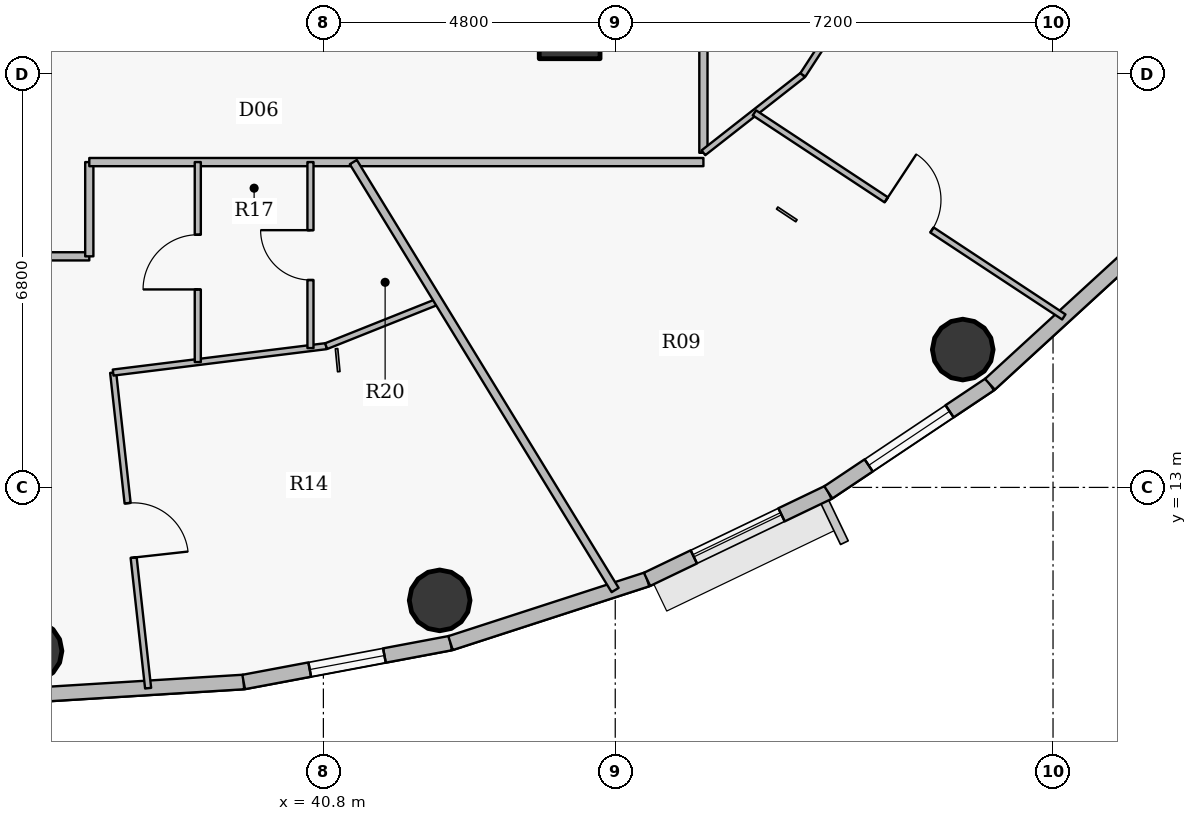
"""IFC4 building model, lengths in metres.
Left out: names, types, materials, properties, quantities, classifications, styles, units other than length and angle.
Written with IfcOpenShell. Run it as: python <this file> out.ifc"""

import sys

from ifc_helpers import new_model, si_unit, direction, frame, frame_2d, origin, origin_2d, place, context, subcontext, project, spatial, rectangle, hollow_circle, extrude, source, transform, mapped, element, fill, save


model = new_model("IFC4")
c1 = context("Model", 3, precision=1e-05, world=origin(), true_north=direction((0.0, 1.0)))
c2 = subcontext(c1, "Body", "Model", "MODEL_VIEW")
j1 = project(units=[si_unit("LENGTHUNIT", "METRE"), si_unit("PLANEANGLEUNIT", "RADIAN")], contexts=[c1])
p1 = place(None, origin())
s1 = spatial("IfcSite", under=j1, at=p1, CompositionType="ELEMENT")
p2 = place(p1, origin())
s2 = spatial("IfcBuilding", under=s1, at=p2, CompositionType="ELEMENT")
p3 = place(p2, frame((0.0, 0.0, 288.0)))
s3 = spatial("IfcBuildingStorey", under=s2, at=p3, CompositionType="ELEMENT", Elevation=288.0)
p4 = place(p3, frame((44.85, 20.55, 0.0), z_axis=(0.0, 0.0, 1.0), x_axis=(1.0, 0.0, 0.0)))
e1 = element("IfcColumn", 1, at=p4, inside=s3, PredefinedType="COLUMN", context=c2, shape_type="SweptSolid", body=[
    extrude(rectangle(XDim=1.0, YDim=1.0, at=origin_2d()), origin(), (0.0, 0.0, 1.0), 3.75),
])
for number, where, z_axis, x_axis in (
    (2, (36.0, 10.31, 0.0), (0.0, 0.0, 1.0), (1.0, 0.0, 0.0)),
    (3, (42.712, 11.142, 0.0), (0.0, 0.0, 1.0), (1.0, 0.0, 0.0)),
    (4, (51.315, 15.267, 0.0), (0.0, 0.0, 1.0), (1.0, 0.0, 0.0)),
):
    element("IfcColumn", number, at=place(p3, frame(where, z_axis=z_axis, x_axis=x_axis)), inside=s3, PredefinedType="COLUMN", context=c2, shape_type="SweptSolid", body=[
        extrude(hollow_circle(Radius=0.5, WallThickness=0.032, at=origin_2d()), origin(), (0.0, 0.0, 1.0), 3.75),
    ])
p5 = place(p3, frame((39.489, 9.8, 0.0), z_axis=(0.0, 0.0, 1.0), x_axis=(-0.998104946479, -0.061534671648, 0.0)))
e5 = element("IfcWall", 5, at=p5, inside=s3, PredefinedType="SOLIDWALL", context=c2, shape_type="SweptSolid", body=[
    extrude(rectangle(XDim=3.495, YDim=0.24, at=frame_2d((1.748, 0.0))), origin(), (0.0, 0.0, 1.0), 3.5),
])
p6 = place(p3, frame((42.891, 10.44, 0.0), z_axis=(0.0, 0.0, 1.0), x_axis=(-0.982782655757, -0.184765395959, 0.0)))
e6 = element("IfcWall", 6, at=p6, inside=s3, PredefinedType="SOLIDWALL", context=c2, shape_type="SweptSolid", body=[
    extrude(rectangle(XDim=3.462, YDim=0.24, at=frame_2d((1.731, 0.0))), origin(), (0.0, 0.0, 1.0), 3.5),
])
p7 = place(p6, frame((1.106, 0.0, 0.9)))
e7 = element("IfcOpeningElement", 7, at=p7, cuts=e6, PredefinedType="OPENING", context=c2, shape_type="SweptSolid", body=[
    extrude(rectangle(XDim=1.25, YDim=1.65, at=origin_2d()), frame((0.625, 0.13, 0.825), z_axis=(0.0, -1.0, 0.0), x_axis=(1.0, 0.0, 0.0)), (0.0, 0.0, 1.0), 0.26),
])
p8 = place(p3, frame((46.123, 11.488, 0.0), z_axis=(0.0, 0.0, 1.0), x_axis=(-0.95123136723, -0.308478339592, 0.0)))
e8 = element("IfcWall", 8, at=p8, inside=s3, PredefinedType="SOLIDWALL", context=c2, shape_type="SweptSolid", body=[
    extrude(rectangle(XDim=3.398, YDim=0.24, at=frame_2d((1.699, 0.0))), origin(), (0.0, 0.0, 1.0), 3.5),
])
p9 = place(p3, frame((49.104, 12.918, 0.0), z_axis=(0.0, 0.0, 1.0), x_axis=(-0.901573741254, -0.43262546051, 0.0)))
e9 = element("IfcWall", 9, at=p9, inside=s3, PredefinedType="SOLIDWALL", context=c2, shape_type="SweptSolid", body=[
    extrude(rectangle(XDim=3.307, YDim=0.24, at=frame_2d((1.653, 0.0))), origin(), (0.0, 0.0, 1.0), 3.5),
])
p10 = place(p9, frame((0.854, 0.0, 0.9)))
e10 = element("IfcOpeningElement", 10, at=p10, cuts=e9, PredefinedType="OPENING", context=c2, shape_type="SweptSolid", body=[
    extrude(rectangle(XDim=1.6, YDim=1.75, at=origin_2d()), frame((0.8, 0.13, 0.875), z_axis=(0.0, -1.0, 0.0), x_axis=(1.0, 0.0, 0.0)), (0.0, 0.0, 1.0), 0.26),
])
p11 = place(p3, frame((51.762, 14.696, 0.0), z_axis=(0.0, 0.0, 1.0), x_axis=(-0.831250592635, -0.55589787933, 0.0)))
e11 = element("IfcWall", 11, at=p11, inside=s3, PredefinedType="SOLIDWALL", context=c2, shape_type="SweptSolid", body=[
    extrude(rectangle(XDim=3.197, YDim=0.24, at=frame_2d((1.599, 0.0))), origin(), (0.0, 0.0, 1.0), 3.5),
])
p12 = place(p11, frame((0.799, 0.0, 0.9)))
e12 = element("IfcOpeningElement", 12, at=p12, cuts=e11, PredefinedType="OPENING", context=c2, shape_type="SweptSolid", body=[
    extrude(rectangle(XDim=1.6, YDim=1.75, at=origin_2d()), frame((0.8, 0.13, 0.875), z_axis=(0.0, -1.0, 0.0), x_axis=(1.0, 0.0, 0.0)), (0.0, 0.0, 1.0), 0.26),
])
p13 = place(p3, frame((54.03, 16.775, 0.0), z_axis=(0.0, 0.0, 1.0), x_axis=(-0.737068506972, -0.675818034703, 0.0)))
e13 = element("IfcWall", 13, at=p13, inside=s3, PredefinedType="SOLIDWALL", context=c2, shape_type="SweptSolid", body=[
    extrude(rectangle(XDim=3.077, YDim=0.24, at=frame_2d((1.539, 0.0))), origin(), (0.0, 0.0, 1.0), 3.5),
])
p14 = place(p3, frame((35.05, 16.8, 0.0), z_axis=(0.0, 0.0, 1.0), x_axis=(1.0, 0.0, 0.0)))
e14 = element("IfcWall", 14, at=p14, inside=s3, PredefinedType="PARTITIONING", context=c2, shape_type="SweptSolid", body=[
    extrude(rectangle(XDim=1.9, YDim=0.135, at=frame_2d((0.95, 0.0))), origin(), (0.0, 0.0, 1.0), 3.035),
])
p15 = place(p3, frame((36.95, 16.8, 0.0), z_axis=(0.0, 0.0, 1.0), x_axis=(0.0, 1.0, 0.0)))
e15 = element("IfcWall", 15, at=p15, inside=s3, PredefinedType="PARTITIONING", context=c2, shape_type="SweptSolid", body=[
    extrude(rectangle(XDim=1.55, YDim=0.135, at=frame_2d((0.775, 0.0))), origin(), (0.0, 0.0, 1.0), 3.5),
])
p16 = place(p3, frame((36.95, 18.35, 0.0), z_axis=(0.0, 0.0, 1.0), x_axis=(1.0, 0.0, 0.0)))
e16 = element("IfcWall", 16, at=p16, inside=s3, PredefinedType="PARTITIONING", context=c2, shape_type="SweptSolid", body=[
    extrude(rectangle(XDim=10.1, YDim=0.135, at=frame_2d((5.05, 0.0))), origin(), (0.0, 0.0, 1.0), 3.035),
])
p17 = place(p3, frame((37.342, 14.888, 0.0), z_axis=(0.0, 0.0, 1.0), x_axis=(0.110149295127, -0.993915053102, 0.0)))
e17 = element("IfcWall", 17, at=p17, inside=s3, PredefinedType="PARTITIONING", context=c2, shape_type="SweptSolid", body=[
    extrude(rectangle(XDim=5.222, YDim=0.1, at=frame_2d((2.611, 0.0))), origin(), (0.0, 0.0, 1.0), 2.985),
])
p18 = place(p17, frame((2.161, 0.0, 0.0)))
e18 = element("IfcOpeningElement", 18, at=p18, cuts=e17, PredefinedType="OPENING", context=c2, shape_type="SweptSolid", body=[
    extrude(rectangle(XDim=0.9, YDim=2.1, at=origin_2d()), frame((0.45, 0.06, 1.05), z_axis=(0.0, -1.0, 0.0), x_axis=(1.0, 0.0, 0.0)), (0.0, 0.0, 1.0), 0.12),
])
p19 = place(p3, frame((37.342, 14.888, 0.0), z_axis=(0.0, 0.0, 1.0), x_axis=(0.992393420873, 0.123106856865, 0.0)))
e19 = element("IfcWall", 19, at=p19, inside=s3, PredefinedType="PARTITIONING", context=c2, shape_type="SweptSolid", body=[
    extrude(rectangle(XDim=3.53, YDim=0.1, at=frame_2d((1.765, 0.0))), origin(), (0.0, 0.0, 1.0), 2.985),
])
p20 = place(p3, frame((38.734, 15.061, 0.0), z_axis=(0.0, 0.0, 1.0), x_axis=(0.0, 1.0, 0.0)))
e20 = element("IfcWall", 20, at=p20, inside=s3, PredefinedType="PARTITIONING", context=c2, shape_type="SweptSolid", body=[
    extrude(rectangle(XDim=3.289, YDim=0.1, at=frame_2d((1.645, 0.0))), origin(), (0.0, 0.0, 1.0), 3.5),
])
p21 = place(p20, frame((1.194, 0.0, 0.0)))
e21 = element("IfcOpeningElement", 21, at=p21, cuts=e20, PredefinedType="OPENING", context=c2, shape_type="SweptSolid", body=[
    extrude(rectangle(XDim=0.9, YDim=2.1, at=origin_2d()), frame((0.45, 0.06, 1.05), z_axis=(0.0, -1.0, 0.0), x_axis=(1.0, 0.0, 0.0)), (0.0, 0.0, 1.0), 0.12),
])
p22 = place(p3, frame((40.587, 15.291, 0.0), z_axis=(0.0, 0.0, 1.0), x_axis=(0.0, 1.0, 0.0)))
e22 = element("IfcWall", 22, at=p22, inside=s3, PredefinedType="PARTITIONING", context=c2, shape_type="SweptSolid", body=[
    extrude(rectangle(XDim=3.059, YDim=0.1, at=frame_2d((1.53, 0.0))), origin(), (0.0, 0.0, 1.0), 3.035),
])
p23 = place(p22, frame((1.119, 0.0, 0.0)))
e23 = element("IfcOpeningElement", 23, at=p23, cuts=e22, PredefinedType="OPENING", context=c2, shape_type="SweptSolid", body=[
    extrude(rectangle(XDim=0.82, YDim=2.1, at=origin_2d()), frame((0.41, 0.06, 1.05), z_axis=(0.0, -1.0, 0.0), x_axis=(1.0, 0.0, 0.0)), (0.0, 0.0, 1.0), 0.12),
])
p24 = place(p3, frame((40.845, 15.323, 0.0), z_axis=(0.0, 0.0, 1.0), x_axis=(0.928797929692, 0.370586569913, 0.0)))
e24 = element("IfcWall", 24, at=p24, inside=s3, PredefinedType="PARTITIONING", context=c2, shape_type="SweptSolid", body=[
    extrude(rectangle(XDim=1.99, YDim=0.1, at=frame_2d((0.995, 0.0))), origin(), (0.0, 0.0, 1.0), 3.035),
])
p25 = place(p3, frame((41.292, 18.35, 0.0), z_axis=(0.0, 0.0, 1.0), x_axis=(0.521891606098, -0.853011812043, 0.0)))
e25 = element("IfcWall", 25, at=p25, inside=s3, PredefinedType="PARTITIONING", context=c2, shape_type="SweptSolid", body=[
    extrude(rectangle(XDim=8.25, YDim=0.135, at=frame_2d((4.125, 0.0))), origin(), (0.0, 0.0, 1.0), 2.985),
])
p26 = place(p3, frame((47.05, 18.503, 0.0), z_axis=(0.0, 0.0, 1.0), x_axis=(0.0, 1.0, 0.0)))
e26 = element("IfcWall", 26, at=p26, inside=s3, PredefinedType="PARTITIONING", context=c2, shape_type="SweptSolid", body=[
    extrude(rectangle(XDim=16.995, YDim=0.135, at=frame_2d((8.497, 0.0))), origin(), (0.0, 0.0, 1.0), 3.035),
])
p27 = place(p26, frame((7.997, 0.0, 0.0)))
e27 = element("IfcOpeningElement", 27, at=p27, cuts=e26, PredefinedType="OPENING", context=c2, shape_type="SweptSolid", body=[
    extrude(rectangle(XDim=1.0, YDim=2.15, at=origin_2d()), frame((0.5, 0.078, 1.075), z_axis=(0.0, -1.0, 0.0), x_axis=(1.0, 0.0, 0.0)), (0.0, 0.0, 1.0), 0.155),
])
p28 = place(p3, frame((47.05, 18.503, 0.0), z_axis=(0.0, 0.0, 1.0), x_axis=(0.787328855274, 0.616533270516, 0.0)))
e28 = element("IfcWall", 28, at=p28, inside=s3, PredefinedType="PARTITIONING", context=c2, shape_type="SweptSolid", body=[
    extrude(rectangle(XDim=2.077, YDim=0.1, at=frame_2d((1.039, 0.0))), origin(), (0.0, 0.0, 1.0), 3.035),
])
p29 = place(p3, frame((47.889, 19.159, 0.0), z_axis=(0.0, 0.0, 1.0), x_axis=(0.834800486956, -0.550552583299, 0.0)))
e29 = element("IfcWall", 29, at=p29, inside=s3, PredefinedType="PARTITIONING", context=c2, shape_type="SweptSolid", body=[
    extrude(rectangle(XDim=6.096, YDim=0.1, at=frame_2d((3.048, 0.0))), origin(), (0.0, 0.0, 1.0), 2.985),
])
p30 = place(p29, frame((2.598, 0.0, 0.0)))
e30 = element("IfcOpeningElement", 30, at=p30, cuts=e29, PredefinedType="OPENING", context=c2, shape_type="SweptSolid", body=[
    extrude(rectangle(XDim=0.9, YDim=2.1, at=origin_2d()), frame((0.45, 0.06, 1.05), z_axis=(0.0, -1.0, 0.0), x_axis=(1.0, 0.0, 0.0)), (0.0, 0.0, 1.0), 0.12),
])
p31 = place(p3, frame((48.685, 19.783, 0.0), z_axis=(0.0, 0.0, 1.0), x_axis=(0.545435886628, 0.838152547916, 0.0)))
e31 = element("IfcWall", 31, at=p31, inside=s3, PredefinedType="PARTITIONING", context=c2, shape_type="SweptSolid", body=[
    extrude(rectangle(XDim=4.083, YDim=0.1, at=frame_2d((2.042, 0.0))), origin(), (0.0, 0.0, 1.0), 3.035),
])
p32 = place(p31, frame((1.592, 0.0, 0.0)))
e32 = element("IfcOpeningElement", 32, at=p32, cuts=e31, PredefinedType="OPENING", context=c2, shape_type="SweptSolid", body=[
    extrude(rectangle(XDim=0.9, YDim=2.1, at=origin_2d()), frame((0.45, 0.06, 1.05), z_axis=(0.0, -1.0, 0.0), x_axis=(1.0, 0.0, 0.0)), (0.0, 0.0, 1.0), 0.12),
])
p33 = place(p3, frame((44.36, 20.2, 0.0), z_axis=(0.0, 0.0, 1.0), x_axis=(1.0, 0.0, 0.0)))
e33 = element("IfcWall", 33, at=p33, inside=s3, PredefinedType="PARTITIONING", context=c2, shape_type="SweptSolid", body=[
    extrude(rectangle(XDim=0.84, YDim=0.135, at=frame_2d((0.42, 0.0))), origin(), (0.0, 0.0, 1.0), 3.035),
])
m1 = source(origin(), c2, "Body", "SweptSolid", [
    extrude(rectangle(XDim=1.6, YDim=1.75, at=origin_2d()), frame((0.8, 0.03, 0.875), z_axis=(0.0, -1.0, 0.0), x_axis=(1.0, 0.0, 0.0)), (0.0, 0.0, 1.0), 0.06),
])
p34 = place(p10, origin())
e34 = element("IfcWindow", 34, at=p34, inside=s3, PartitioningType="DOUBLE_PANEL_VERTICAL", PredefinedType="WINDOW", context=c2, shape_type="MappedRepresentation", body=[
    mapped(m1, transform((0.0, 0.0, 0.0), x_axis=(1.0, 0.0, 0.0), y_axis=(0.0, 1.0, 0.0), z_axis=(0.0, 0.0, 1.0), scale=1.0)),
])
fill(e10, e34)
p35 = place(p12, origin())
e35 = element("IfcWindow", 35, at=p35, inside=s3, PartitioningType="DOUBLE_PANEL_VERTICAL", PredefinedType="WINDOW", context=c2, shape_type="MappedRepresentation", body=[
    mapped(m1, transform((0.0, 0.0, 0.0), x_axis=(1.0, 0.0, 0.0), y_axis=(0.0, 1.0, 0.0), z_axis=(0.0, 0.0, 1.0), scale=1.0)),
])
fill(e12, e35)
m2 = source(origin(), c2, "Body", "SweptSolid", [
    extrude(rectangle(XDim=1.25, YDim=1.65, at=origin_2d()), frame((0.625, 0.03, 0.825), z_axis=(0.0, -1.0, 0.0), x_axis=(1.0, 0.0, 0.0)), (0.0, 0.0, 1.0), 0.06),
])
p36 = place(p7, origin())
e36 = element("IfcWindow", 36, at=p36, inside=s3, PartitioningType="SINGLE_PANEL", PredefinedType="WINDOW", context=c2, shape_type="MappedRepresentation", body=[
    mapped(m2, transform((0.0, 0.0, 0.0), x_axis=(1.0, 0.0, 0.0), y_axis=(0.0, 1.0, 0.0), z_axis=(0.0, 0.0, 1.0), scale=1.0)),
])
fill(e7, e36)
m3 = source(origin(), c2, "Body", "SweptSolid", [
    extrude(rectangle(XDim=0.9, YDim=2.1, at=origin_2d()), frame((0.45, 0.025, 1.05), z_axis=(0.0, -1.0, 0.0), x_axis=(1.0, 0.0, 0.0)), (0.0, 0.0, 1.0), 0.05),
])
p37 = place(p18, origin())
e37 = element("IfcDoor", 37, at=p37, inside=s3, OperationType="SINGLE_SWING_RIGHT", PredefinedType="DOOR", context=c2, shape_type="MappedRepresentation", body=[
    mapped(m3, transform((0.0, 0.0, 0.0), x_axis=(1.0, 0.0, 0.0), y_axis=(0.0, 1.0, 0.0), z_axis=(0.0, 0.0, 1.0), scale=1.0)),
])
fill(e18, e37)
p38 = place(p21, origin())
e38 = element("IfcDoor", 38, at=p38, inside=s3, OperationType="SINGLE_SWING_LEFT", PredefinedType="DOOR", context=c2, shape_type="MappedRepresentation", body=[
    mapped(m3, transform((0.0, 0.0, 0.0), x_axis=(1.0, 0.0, 0.0), y_axis=(0.0, 1.0, 0.0), z_axis=(0.0, 0.0, 1.0), scale=1.0)),
])
fill(e21, e38)
m4 = source(origin(), c2, "Body", "SweptSolid", [
    extrude(rectangle(XDim=0.82, YDim=2.1, at=origin_2d()), frame((0.41, 0.025, 1.05), z_axis=(0.0, -1.0, 0.0), x_axis=(1.0, 0.0, 0.0)), (0.0, 0.0, 1.0), 0.05),
])
p39 = place(p23, origin())
e39 = element("IfcDoor", 39, at=p39, inside=s3, OperationType="SINGLE_SWING_RIGHT", PredefinedType="DOOR", context=c2, shape_type="MappedRepresentation", body=[
    mapped(m4, transform((0.0, 0.0, 0.0), x_axis=(1.0, 0.0, 0.0), y_axis=(0.0, 1.0, 0.0), z_axis=(0.0, 0.0, 1.0), scale=1.0)),
])
fill(e23, e39)
p40 = place(p30, origin())
e40 = element("IfcDoor", 40, at=p40, inside=s3, OperationType="SINGLE_SWING_LEFT", PredefinedType="DOOR", context=c2, shape_type="MappedRepresentation", body=[
    mapped(m3, transform((0.0, 0.0, 0.0), x_axis=(1.0, 0.0, 0.0), y_axis=(0.0, 1.0, 0.0), z_axis=(0.0, 0.0, 1.0), scale=1.0)),
])
fill(e30, e40)
save(model, sys.argv[1])
